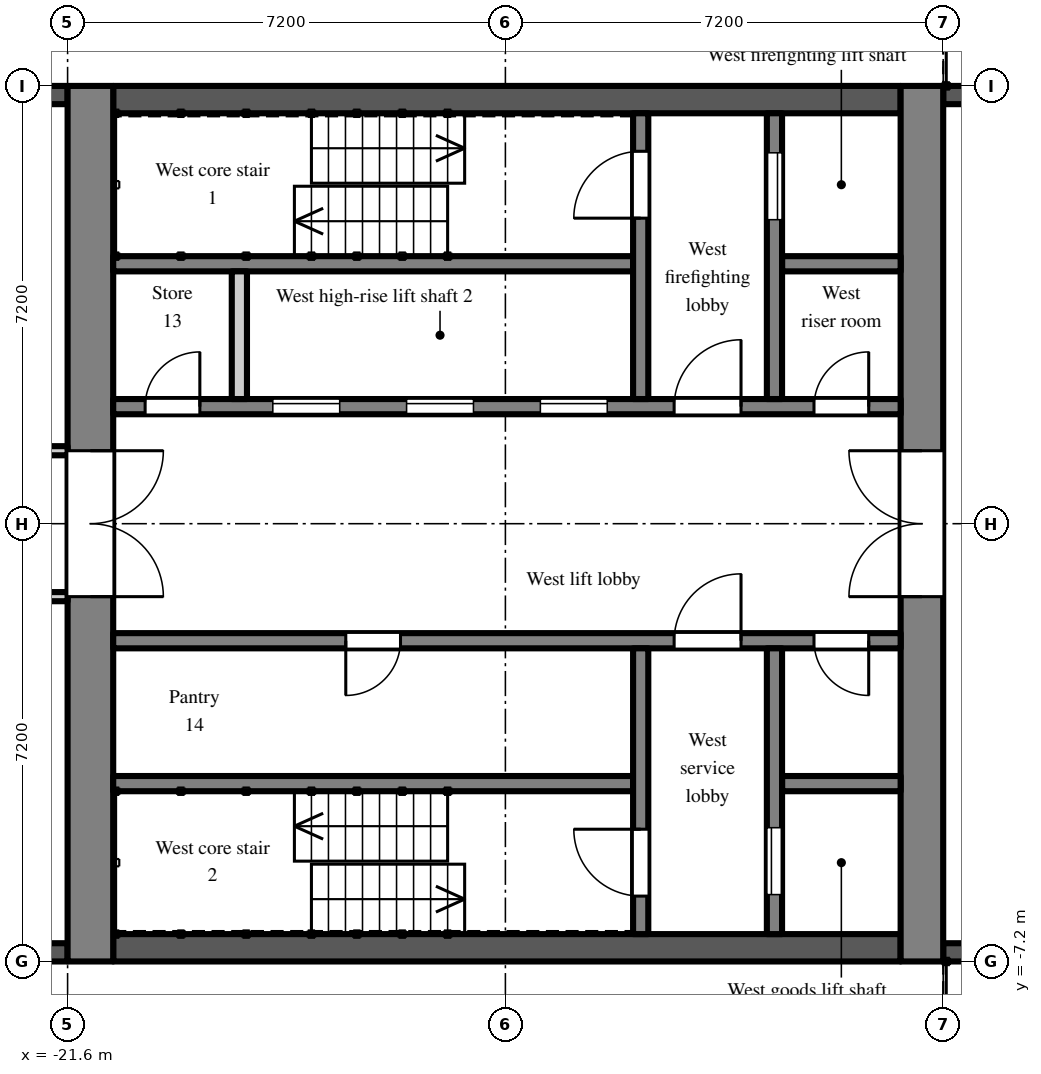
"""IFC4 building model, lengths in metres.
Left out: names, types, materials, properties, quantities, classifications, styles, units other than length and angle.
Written with IfcOpenShell. Run it as: python <this file> out.ifc"""

import sys

from ifc_helpers import new_model, si_unit, direction, frame, frame_2d, origin, place, context, subcontext, project, spatial, rectangle, extrude, element, fill, save


model = new_model("IFC4")
c1 = context("Model", 3, precision=1e-05, world=origin(), true_north=direction((0.0, 1.0)))
c2 = subcontext(c1, "Body", "Model", "MODEL_VIEW")
j1 = project(units=[si_unit("LENGTHUNIT", "METRE"), si_unit("PLANEANGLEUNIT", "RADIAN")], contexts=[c1])
p1 = place(None, origin())
s1 = spatial("IfcSite", under=j1, at=p1, CompositionType="ELEMENT")
p2 = place(p1, origin())
s2 = spatial("IfcBuilding", under=s1, at=p2, CompositionType="ELEMENT")
p3 = place(p2, frame((0.0, 0.0, 159.3)))
s3 = spatial("IfcBuildingStorey", under=s2, at=p3, CompositionType="ELEMENT", Elevation=159.3)
p4 = place(p3, frame((-4.2, 7.05, 0.0), z_axis=(0.0, 0.0, 1.0), x_axis=(-1.0, 0.0, 0.0)))
e1 = element("IfcWall", 1, at=p4, inside=s3, PredefinedType="SOLIDWALL", context=c2, shape_type="SweptSolid", body=[
    extrude(rectangle(XDim=3.0, YDim=0.3, at=frame_2d((1.5, 0.0))), origin(), (0.0, 0.0, 1.0), 2.55),
])
p5 = place(p3, frame((-21.6, 7.05, 0.0), z_axis=(0.0, 0.0, 1.0), x_axis=(-1.0, 0.0, 0.0)))
e2 = element("IfcWall", 2, at=p5, inside=s3, PredefinedType="SOLIDWALL", context=c2, shape_type="SweptSolid", body=[
    extrude(rectangle(XDim=2.7, YDim=0.3, at=frame_2d((1.35, 0.0))), origin(), (0.0, 0.0, 1.0), 2.2),
])
p6 = place(p5, frame((0.75, 0.0, 0.2)))
e3 = element("IfcOpeningElement", 3, at=p6, cuts=e2, PredefinedType="OPENING", context=c2, shape_type="SweptSolid", body=[
    extrude(rectangle(XDim=1.2, YDim=1.85, at=frame_2d((0.6, 0.925))), frame((0.0, 0.16, 0.0), z_axis=(0.0, -1.0, 0.0), x_axis=(1.0, 0.0, 0.0)), (0.0, 0.0, 1.0), 0.32),
])
p7 = place(p3, frame((-24.3, -7.05, 0.0), z_axis=(0.0, 0.0, 1.0), x_axis=(1.0, 0.0, 0.0)))
e4 = element("IfcWall", 4, at=p7, inside=s3, PredefinedType="SOLIDWALL", context=c2, shape_type="SweptSolid", body=[
    extrude(rectangle(XDim=2.7, YDim=0.3, at=frame_2d((1.35, 0.0))), origin(), (0.0, 0.0, 1.0), 2.2),
])
p8 = place(p3, frame((-7.2, -7.05, 0.0), z_axis=(0.0, 0.0, 1.0), x_axis=(1.0, 0.0, 0.0)))
e5 = element("IfcWall", 5, at=p8, inside=s3, PredefinedType="SOLIDWALL", context=c2, shape_type="SweptSolid", body=[
    extrude(rectangle(XDim=3.0, YDim=0.3, at=frame_2d((1.5, 0.0))), origin(), (0.0, 0.0, 1.0), 2.55),
])
p9 = place(p3, frame((-7.55, -7.2, 0.0), z_axis=(0.0, 0.0, 1.0), x_axis=(0.0, 1.0, 0.0)))
e6 = element("IfcWall", 6, at=p9, inside=s3, PredefinedType="SHEAR", context=c2, shape_type="SweptSolid", body=[
    extrude(rectangle(XDim=14.4, YDim=0.7, at=frame_2d((7.2, 0.0))), origin(), (0.0, 0.0, 1.0), 2.55),
])
p10 = place(p9, frame((6.0, 0.0, 0.0)))
e7 = element("IfcOpeningElement", 7, at=p10, cuts=e6, PredefinedType="OPENING", context=c2, shape_type="SweptSolid", body=[
    extrude(rectangle(XDim=2.4, YDim=2.2, at=frame_2d((1.2, 1.1))), frame((0.0, 0.36, 0.0), z_axis=(0.0, -1.0, 0.0), x_axis=(1.0, 0.0, 0.0)), (0.0, 0.0, 1.0), 0.72),
])
p11 = place(p3, frame((-21.225, -7.2, 0.0), z_axis=(0.0, 0.0, 1.0), x_axis=(0.0, 1.0, 0.0)))
e8 = element("IfcWall", 8, at=p11, inside=s3, PredefinedType="SHEAR", context=c2, shape_type="SweptSolid", body=[
    extrude(rectangle(XDim=14.4, YDim=0.75, at=frame_2d((7.2, 0.0))), origin(), (0.0, 0.0, 1.0), 2.55),
])
p12 = place(p11, frame((6.0, 0.0, 0.0)))
e9 = element("IfcOpeningElement", 9, at=p12, cuts=e8, PredefinedType="OPENING", context=c2, shape_type="SweptSolid", body=[
    extrude(rectangle(XDim=2.4, YDim=2.2, at=frame_2d((1.2, 1.1))), frame((0.0, 0.385, 0.0), z_axis=(0.0, -1.0, 0.0), x_axis=(1.0, 0.0, 0.0)), (0.0, 0.0, 1.0), 0.77),
])
p13 = place(p3, frame((-7.9, 6.975, 0.0), z_axis=(0.0, 0.0, 1.0), x_axis=(-1.0, 0.0, 0.0)))
e10 = element("IfcWall", 10, at=p13, inside=s3, PredefinedType="SHEAR", context=c2, shape_type="SweptSolid", body=[
    extrude(rectangle(XDim=12.95, YDim=0.45, at=frame_2d((6.475, 0.0))), origin(), (0.0, 0.0, 1.0), 2.55),
])
p14 = place(p3, frame((-7.9, 1.925, 0.0), z_axis=(0.0, 0.0, 1.0), x_axis=(-1.0, 0.0, 0.0)))
e11 = element("IfcWall", 11, at=p14, inside=s3, PredefinedType="SHEAR", context=c2, shape_type="SweptSolid", body=[
    extrude(rectangle(XDim=12.95, YDim=0.25, at=frame_2d((6.475, 0.0))), origin(), (0.0, 0.0, 1.0), 2.55),
])
p15 = place(p14, frame((4.825, 0.0, 0.0)))
e12 = element("IfcOpeningElement", 12, at=p15, cuts=e11, PredefinedType="OPENING", context=c2, shape_type="SweptSolid", body=[
    extrude(rectangle(XDim=1.1, YDim=2.1, at=frame_2d((0.55, 1.05))), frame((0.0, 0.135, 0.0), z_axis=(0.0, -1.0, 0.0), x_axis=(1.0, 0.0, 0.0)), (0.0, 0.0, 1.0), 0.27),
])
p16 = place(p14, frame((7.025, 0.0, 0.0)))
e13 = element("IfcOpeningElement", 13, at=p16, cuts=e11, PredefinedType="OPENING", context=c2, shape_type="SweptSolid", body=[
    extrude(rectangle(XDim=1.1, YDim=2.1, at=frame_2d((0.55, 1.05))), frame((0.0, 0.135, 0.0), z_axis=(0.0, -1.0, 0.0), x_axis=(1.0, 0.0, 0.0)), (0.0, 0.0, 1.0), 0.27),
])
p17 = place(p14, frame((9.225, 0.0, 0.0)))
e14 = element("IfcOpeningElement", 14, at=p17, cuts=e11, PredefinedType="OPENING", context=c2, shape_type="SweptSolid", body=[
    extrude(rectangle(XDim=1.1, YDim=2.1, at=frame_2d((0.55, 1.05))), frame((0.0, 0.135, 0.0), z_axis=(0.0, -1.0, 0.0), x_axis=(1.0, 0.0, 0.0)), (0.0, 0.0, 1.0), 0.27),
])
p18 = place(p14, frame((0.525, 0.0, 0.0)))
e15 = element("IfcOpeningElement", 15, at=p18, cuts=e11, PredefinedType="OPENING", context=c2, shape_type="SweptSolid", body=[
    extrude(rectangle(XDim=0.9, YDim=2.1, at=frame_2d((0.45, 1.05))), frame((0.0, 0.135, 0.0), z_axis=(0.0, -1.0, 0.0), x_axis=(1.0, 0.0, 0.0)), (0.0, 0.0, 1.0), 0.27),
])
p19 = place(p14, frame((2.625, 0.0, 0.0)))
e16 = element("IfcOpeningElement", 16, at=p19, cuts=e11, PredefinedType="OPENING", context=c2, shape_type="SweptSolid", body=[
    extrude(rectangle(XDim=1.1, YDim=2.1, at=frame_2d((0.55, 1.05))), frame((0.0, 0.135, 0.0), z_axis=(0.0, -1.0, 0.0), x_axis=(1.0, 0.0, 0.0)), (0.0, 0.0, 1.0), 0.27),
])
p20 = place(p14, frame((11.525, 0.0, 0.0)))
e17 = element("IfcOpeningElement", 17, at=p20, cuts=e11, PredefinedType="OPENING", context=c2, shape_type="SweptSolid", body=[
    extrude(rectangle(XDim=0.9, YDim=2.1, at=frame_2d((0.45, 1.05))), frame((0.0, 0.135, 0.0), z_axis=(0.0, -1.0, 0.0), x_axis=(1.0, 0.0, 0.0)), (0.0, 0.0, 1.0), 0.27),
])
p21 = place(p3, frame((-7.9, 4.275, 0.0), z_axis=(0.0, 0.0, 1.0), x_axis=(-1.0, 0.0, 0.0)))
e18 = element("IfcWall", 18, at=p21, inside=s3, PredefinedType="SHEAR", context=c2, shape_type="SweptSolid", body=[
    extrude(rectangle(XDim=1.95, YDim=0.25, at=frame_2d((0.975, 0.0))), origin(), (0.0, 0.0, 1.0), 2.55),
])
p22 = place(p3, frame((-12.3, 4.275, 0.0), z_axis=(0.0, 0.0, 1.0), x_axis=(-1.0, 0.0, 0.0)))
e19 = element("IfcWall", 19, at=p22, inside=s3, PredefinedType="SHEAR", context=c2, shape_type="SweptSolid", body=[
    extrude(rectangle(XDim=8.55, YDim=0.25, at=frame_2d((4.275, 0.0))), origin(), (0.0, 0.0, 1.0), 2.55),
])
p23 = place(p3, frame((-9.975, 2.05, 0.0), z_axis=(0.0, 0.0, 1.0), x_axis=(0.0, 1.0, 0.0)))
e20 = element("IfcWall", 20, at=p23, inside=s3, PredefinedType="SHEAR", context=c2, shape_type="SweptSolid", body=[
    extrude(rectangle(XDim=4.7, YDim=0.25, at=frame_2d((2.35, 0.0))), origin(), (0.0, 0.0, 1.0), 2.55),
])
p24 = place(p23, frame((2.95, 0.0, 0.0)))
e21 = element("IfcOpeningElement", 21, at=p24, cuts=e20, PredefinedType="OPENING", context=c2, shape_type="SweptSolid", body=[
    extrude(rectangle(XDim=1.1, YDim=2.1, at=frame_2d((0.55, 1.05))), frame((0.0, 0.135, 0.0), z_axis=(0.0, -1.0, 0.0), x_axis=(1.0, 0.0, 0.0)), (0.0, 0.0, 1.0), 0.27),
])
p25 = place(p3, frame((-12.175, 2.05, 0.0), z_axis=(0.0, 0.0, 1.0), x_axis=(0.0, 1.0, 0.0)))
e22 = element("IfcWall", 22, at=p25, inside=s3, PredefinedType="SHEAR", context=c2, shape_type="SweptSolid", body=[
    extrude(rectangle(XDim=4.7, YDim=0.25, at=frame_2d((2.35, 0.0))), origin(), (0.0, 0.0, 1.0), 2.55),
])
p26 = place(p25, frame((2.975, 0.0, 0.0)))
e23 = element("IfcOpeningElement", 23, at=p26, cuts=e22, PredefinedType="OPENING", context=c2, shape_type="SweptSolid", body=[
    extrude(rectangle(XDim=1.1, YDim=2.1, at=frame_2d((0.55, 1.05))), frame((0.0, 0.135, 0.0), z_axis=(0.0, -1.0, 0.0), x_axis=(1.0, 0.0, 0.0)), (0.0, 0.0, 1.0), 0.27),
])
p27 = place(p3, frame((-18.775, 2.05, 0.0), z_axis=(0.0, 0.0, 1.0), x_axis=(0.0, 1.0, 0.0)))
e24 = element("IfcWall", 24, at=p27, inside=s3, PredefinedType="PARTITIONING", context=c2, shape_type="SweptSolid", body=[
    extrude(rectangle(XDim=2.1, YDim=0.25, at=frame_2d((1.05, 0.0))), origin(), (0.0, 0.0, 1.0), 2.55),
])
p28 = place(p3, frame((-7.9, -6.975, 0.0), z_axis=(0.0, 0.0, 1.0), x_axis=(-1.0, 0.0, 0.0)))
e25 = element("IfcWall", 25, at=p28, inside=s3, PredefinedType="SHEAR", context=c2, shape_type="SweptSolid", body=[
    extrude(rectangle(XDim=12.95, YDim=0.45, at=frame_2d((6.475, 0.0))), origin(), (0.0, 0.0, 1.0), 2.55),
])
p29 = place(p3, frame((-7.9, -1.925, 0.0), z_axis=(0.0, 0.0, 1.0), x_axis=(-1.0, 0.0, 0.0)))
e26 = element("IfcWall", 26, at=p29, inside=s3, PredefinedType="SHEAR", context=c2, shape_type="SweptSolid", body=[
    extrude(rectangle(XDim=12.95, YDim=0.25, at=frame_2d((6.475, 0.0))), origin(), (0.0, 0.0, 1.0), 2.55),
])
p30 = place(p29, frame((0.525, 0.0, 0.0)))
e27 = element("IfcOpeningElement", 27, at=p30, cuts=e26, PredefinedType="OPENING", context=c2, shape_type="SweptSolid", body=[
    extrude(rectangle(XDim=0.9, YDim=2.1, at=frame_2d((0.45, 1.05))), frame((0.0, 0.135, 0.0), z_axis=(0.0, -1.0, 0.0), x_axis=(1.0, 0.0, 0.0)), (0.0, 0.0, 1.0), 0.27),
])
p31 = place(p29, frame((2.625, 0.0, 0.0)))
e28 = element("IfcOpeningElement", 28, at=p31, cuts=e26, PredefinedType="OPENING", context=c2, shape_type="SweptSolid", body=[
    extrude(rectangle(XDim=1.1, YDim=2.1, at=frame_2d((0.55, 1.05))), frame((0.0, 0.135, 0.0), z_axis=(0.0, -1.0, 0.0), x_axis=(1.0, 0.0, 0.0)), (0.0, 0.0, 1.0), 0.27),
])
p32 = place(p29, frame((8.225, 0.0, 0.0)))
e29 = element("IfcOpeningElement", 29, at=p32, cuts=e26, PredefinedType="OPENING", context=c2, shape_type="SweptSolid", body=[
    extrude(rectangle(XDim=0.9, YDim=2.1, at=frame_2d((0.45, 1.05))), frame((0.0, 0.135, 0.0), z_axis=(0.0, -1.0, 0.0), x_axis=(1.0, 0.0, 0.0)), (0.0, 0.0, 1.0), 0.27),
])
p33 = place(p3, frame((-7.9, -4.275, 0.0), z_axis=(0.0, 0.0, 1.0), x_axis=(-1.0, 0.0, 0.0)))
e30 = element("IfcWall", 30, at=p33, inside=s3, PredefinedType="SHEAR", context=c2, shape_type="SweptSolid", body=[
    extrude(rectangle(XDim=1.95, YDim=0.25, at=frame_2d((0.975, 0.0))), origin(), (0.0, 0.0, 1.0), 2.55),
])
p34 = place(p3, frame((-12.3, -4.275, 0.0), z_axis=(0.0, 0.0, 1.0), x_axis=(-1.0, 0.0, 0.0)))
e31 = element("IfcWall", 31, at=p34, inside=s3, PredefinedType="SHEAR", context=c2, shape_type="SweptSolid", body=[
    extrude(rectangle(XDim=8.55, YDim=0.25, at=frame_2d((4.275, 0.0))), origin(), (0.0, 0.0, 1.0), 2.55),
])
p35 = place(p3, frame((-9.975, -2.05, 0.0), z_axis=(0.0, 0.0, 1.0), x_axis=(0.0, -1.0, 0.0)))
e32 = element("IfcWall", 32, at=p35, inside=s3, PredefinedType="SHEAR", context=c2, shape_type="SweptSolid", body=[
    extrude(rectangle(XDim=4.7, YDim=0.25, at=frame_2d((2.35, 0.0))), origin(), (0.0, 0.0, 1.0), 2.55),
])
p36 = place(p35, frame((2.95, 0.0, 0.0)))
e33 = element("IfcOpeningElement", 33, at=p36, cuts=e32, PredefinedType="OPENING", context=c2, shape_type="SweptSolid", body=[
    extrude(rectangle(XDim=1.1, YDim=2.1, at=frame_2d((0.55, 1.05))), frame((0.0, 0.135, 0.0), z_axis=(0.0, -1.0, 0.0), x_axis=(1.0, 0.0, 0.0)), (0.0, 0.0, 1.0), 0.27),
])
p37 = place(p3, frame((-12.175, -2.05, 0.0), z_axis=(0.0, 0.0, 1.0), x_axis=(0.0, -1.0, 0.0)))
e34 = element("IfcWall", 34, at=p37, inside=s3, PredefinedType="SHEAR", context=c2, shape_type="SweptSolid", body=[
    extrude(rectangle(XDim=4.7, YDim=0.25, at=frame_2d((2.35, 0.0))), origin(), (0.0, 0.0, 1.0), 2.55),
])
p38 = place(p37, frame((2.975, 0.0, 0.0)))
e35 = element("IfcOpeningElement", 35, at=p38, cuts=e34, PredefinedType="OPENING", context=c2, shape_type="SweptSolid", body=[
    extrude(rectangle(XDim=1.1, YDim=2.1, at=frame_2d((0.55, 1.05))), frame((0.0, 0.135, 0.0), z_axis=(0.0, -1.0, 0.0), x_axis=(1.0, 0.0, 0.0)), (0.0, 0.0, 1.0), 0.27),
])
p39 = place(p3, frame((-36.5, -1.2, 0.0), z_axis=(0.0, 0.0, 1.0), x_axis=(1.0, 0.0, 0.0)))
e36 = element("IfcWall", 36, at=p39, inside=s3, PredefinedType="PARTITIONING", context=c2, shape_type="SweptSolid", body=[
    extrude(rectangle(XDim=14.9, YDim=0.15, at=frame_2d((7.45, 0.0))), origin(), (0.0, 0.0, 1.0), 2.55),
])
p40 = place(p39, frame((10.4, 0.0, 0.0)))
e37 = element("IfcOpeningElement", 37, at=p40, cuts=e36, PredefinedType="OPENING", context=c2, shape_type="SweptSolid", body=[
    extrude(rectangle(XDim=1.8, YDim=2.1, at=frame_2d((0.9, 1.05))), frame((0.0, 0.085, 0.0), z_axis=(0.0, -1.0, 0.0), x_axis=(1.0, 0.0, 0.0)), (0.0, 0.0, 1.0), 0.17),
])
p41 = place(p39, frame((4.3, 0.0, 0.0)))
e38 = element("IfcOpeningElement", 38, at=p41, cuts=e36, PredefinedType="OPENING", context=c2, shape_type="SweptSolid", body=[
    extrude(rectangle(XDim=1.0, YDim=2.1, at=frame_2d((0.5, 1.05))), frame((0.0, 0.085, 0.0), z_axis=(0.0, -1.0, 0.0), x_axis=(1.0, 0.0, 0.0)), (0.0, 0.0, 1.0), 0.17),
])
p42 = place(p39, frame((1.15, 0.0, 0.0)))
e39 = element("IfcOpeningElement", 39, at=p42, cuts=e36, PredefinedType="OPENING", context=c2, shape_type="SweptSolid", body=[
    extrude(rectangle(XDim=1.8, YDim=2.1, at=frame_2d((0.9, 1.05))), frame((0.0, 0.085, 0.0), z_axis=(0.0, -1.0, 0.0), x_axis=(1.0, 0.0, 0.0)), (0.0, 0.0, 1.0), 0.17),
])
p43 = place(p3, frame((-36.5, 1.2, 0.0), z_axis=(0.0, 0.0, 1.0), x_axis=(1.0, 0.0, 0.0)))
e40 = element("IfcWall", 40, at=p43, inside=s3, PredefinedType="PARTITIONING", context=c2, shape_type="SweptSolid", body=[
    extrude(rectangle(XDim=14.9, YDim=0.15, at=frame_2d((7.45, 0.0))), origin(), (0.0, 0.0, 1.0), 2.55),
])
p44 = place(p43, frame((10.4, 0.0, 0.0)))
e41 = element("IfcOpeningElement", 41, at=p44, cuts=e40, PredefinedType="OPENING", context=c2, shape_type="SweptSolid", body=[
    extrude(rectangle(XDim=1.8, YDim=2.1, at=frame_2d((0.9, 1.05))), frame((0.0, 0.085, 0.0), z_axis=(0.0, -1.0, 0.0), x_axis=(1.0, 0.0, 0.0)), (0.0, 0.0, 1.0), 0.17),
])
p45 = place(p43, frame((5.45, 0.0, 0.0)))
e42 = element("IfcOpeningElement", 42, at=p45, cuts=e40, PredefinedType="OPENING", context=c2, shape_type="SweptSolid", body=[
    extrude(rectangle(XDim=0.9, YDim=2.1, at=frame_2d((0.45, 1.05))), frame((0.0, 0.085, 0.0), z_axis=(0.0, -1.0, 0.0), x_axis=(1.0, 0.0, 0.0)), (0.0, 0.0, 1.0), 0.17),
])
p46 = place(p43, frame((1.15, 0.0, 0.0)))
e43 = element("IfcOpeningElement", 43, at=p46, cuts=e40, PredefinedType="OPENING", context=c2, shape_type="SweptSolid", body=[
    extrude(rectangle(XDim=1.8, YDim=2.1, at=frame_2d((0.9, 1.05))), frame((0.0, 0.085, 0.0), z_axis=(0.0, -1.0, 0.0), x_axis=(1.0, 0.0, 0.0)), (0.0, 0.0, 1.0), 0.17),
])
p47 = place(p15, origin())
e44 = element("IfcDoor", 44, at=p47, inside=s3, OperationType="SLIDING_TO_LEFT", PredefinedType="DOOR", context=c2, shape_type="SweptSolid", body=[
    extrude(rectangle(XDim=1.1, YDim=2.1, at=frame_2d((0.55, 1.05))), frame((0.0, 0.025, 0.0), z_axis=(0.0, -1.0, 0.0), x_axis=(1.0, 0.0, 0.0)), (0.0, 0.0, 1.0), 0.05),
])
fill(e12, e44)
p48 = place(p16, origin())
e45 = element("IfcDoor", 45, at=p48, inside=s3, OperationType="SLIDING_TO_LEFT", PredefinedType="DOOR", context=c2, shape_type="SweptSolid", body=[
    extrude(rectangle(XDim=1.1, YDim=2.1, at=frame_2d((0.55, 1.05))), frame((0.0, 0.025, 0.0), z_axis=(0.0, -1.0, 0.0), x_axis=(1.0, 0.0, 0.0)), (0.0, 0.0, 1.0), 0.05),
])
fill(e13, e45)
p49 = place(p17, origin())
e46 = element("IfcDoor", 46, at=p49, inside=s3, OperationType="SLIDING_TO_LEFT", PredefinedType="DOOR", context=c2, shape_type="SweptSolid", body=[
    extrude(rectangle(XDim=1.1, YDim=2.1, at=frame_2d((0.55, 1.05))), frame((0.0, 0.025, 0.0), z_axis=(0.0, -1.0, 0.0), x_axis=(1.0, 0.0, 0.0)), (0.0, 0.0, 1.0), 0.05),
])
fill(e14, e46)
p50 = place(p24, origin())
e47 = element("IfcDoor", 47, at=p50, inside=s3, OperationType="SLIDING_TO_LEFT", PredefinedType="DOOR", context=c2, shape_type="SweptSolid", body=[
    extrude(rectangle(XDim=1.1, YDim=2.1, at=frame_2d((0.55, 1.05))), frame((0.0, 0.025, 0.0), z_axis=(0.0, -1.0, 0.0), x_axis=(1.0, 0.0, 0.0)), (0.0, 0.0, 1.0), 0.05),
])
fill(e21, e47)
p51 = place(p36, origin())
e48 = element("IfcDoor", 48, at=p51, inside=s3, OperationType="SLIDING_TO_LEFT", PredefinedType="DOOR", context=c2, shape_type="SweptSolid", body=[
    extrude(rectangle(XDim=1.1, YDim=2.1, at=frame_2d((0.55, 1.05))), frame((0.0, 0.025, 0.0), z_axis=(0.0, -1.0, 0.0), x_axis=(1.0, 0.0, 0.0)), (0.0, 0.0, 1.0), 0.05),
])
fill(e33, e48)
p52 = place(p26, origin())
e49 = element("IfcDoor", 49, at=p52, inside=s3, OperationType="SINGLE_SWING_LEFT", PredefinedType="DOOR", context=c2, shape_type="SweptSolid", body=[
    extrude(rectangle(XDim=1.1, YDim=2.1, at=frame_2d((0.55, 1.05))), frame((0.0, 0.025, 0.0), z_axis=(0.0, -1.0, 0.0), x_axis=(1.0, 0.0, 0.0)), (0.0, 0.0, 1.0), 0.05),
])
fill(e23, e49)
p53 = place(p38, frame((1.1, 0.0, 0.0), z_axis=(0.0, 0.0, 1.0), x_axis=(-1.0, 0.0, 0.0)))
e50 = element("IfcDoor", 50, at=p53, inside=s3, OperationType="SINGLE_SWING_RIGHT", PredefinedType="DOOR", context=c2, shape_type="SweptSolid", body=[
    extrude(rectangle(XDim=1.1, YDim=2.1, at=frame_2d((0.55, 1.05))), frame((0.0, 0.025, 0.0), z_axis=(0.0, -1.0, 0.0), x_axis=(1.0, 0.0, 0.0)), (0.0, 0.0, 1.0), 0.05),
])
fill(e35, e50)
p54 = place(p18, frame((0.9, 0.0, 0.0), z_axis=(0.0, 0.0, 1.0), x_axis=(-1.0, 0.0, 0.0)))
e51 = element("IfcDoor", 51, at=p54, inside=s3, OperationType="SINGLE_SWING_RIGHT", PredefinedType="DOOR", context=c2, shape_type="SweptSolid", body=[
    extrude(rectangle(XDim=0.9, YDim=2.1, at=frame_2d((0.45, 1.05))), frame((0.0, 0.025, 0.0), z_axis=(0.0, -1.0, 0.0), x_axis=(1.0, 0.0, 0.0)), (0.0, 0.0, 1.0), 0.05),
])
fill(e15, e51)
p55 = place(p30, origin())
e52 = element("IfcDoor", 52, at=p55, inside=s3, OperationType="SINGLE_SWING_LEFT", PredefinedType="DOOR", context=c2, shape_type="SweptSolid", body=[
    extrude(rectangle(XDim=0.9, YDim=2.1, at=frame_2d((0.45, 1.05))), frame((0.0, 0.025, 0.0), z_axis=(0.0, -1.0, 0.0), x_axis=(1.0, 0.0, 0.0)), (0.0, 0.0, 1.0), 0.05),
])
fill(e27, e52)
p56 = place(p19, frame((1.1, 0.0, 0.0), z_axis=(0.0, 0.0, 1.0), x_axis=(-1.0, 0.0, 0.0)))
e53 = element("IfcDoor", 53, at=p56, inside=s3, OperationType="SINGLE_SWING_RIGHT", PredefinedType="DOOR", context=c2, shape_type="SweptSolid", body=[
    extrude(rectangle(XDim=1.1, YDim=2.1, at=frame_2d((0.55, 1.05))), frame((0.0, 0.025, 0.0), z_axis=(0.0, -1.0, 0.0), x_axis=(1.0, 0.0, 0.0)), (0.0, 0.0, 1.0), 0.05),
])
fill(e16, e53)
p57 = place(p31, frame((1.1, 0.0, 0.0), z_axis=(0.0, 0.0, 1.0), x_axis=(-1.0, 0.0, 0.0)))
e54 = element("IfcDoor", 54, at=p57, inside=s3, OperationType="SINGLE_SWING_RIGHT", PredefinedType="DOOR", context=c2, shape_type="SweptSolid", body=[
    extrude(rectangle(XDim=1.1, YDim=2.1, at=frame_2d((0.55, 1.05))), frame((0.0, 0.025, 0.0), z_axis=(0.0, -1.0, 0.0), x_axis=(1.0, 0.0, 0.0)), (0.0, 0.0, 1.0), 0.05),
])
fill(e28, e54)
p58 = place(p10, origin())
e55 = element("IfcDoor", 55, at=p58, inside=s3, OperationType="DOUBLE_DOOR_DOUBLE_SWING", PredefinedType="DOOR", context=c2, shape_type="SweptSolid", body=[
    extrude(rectangle(XDim=2.4, YDim=2.2, at=frame_2d((1.2, 1.1))), frame((0.0, 0.025, 0.0), z_axis=(0.0, -1.0, 0.0), x_axis=(1.0, 0.0, 0.0)), (0.0, 0.0, 1.0), 0.05),
])
fill(e7, e55)
p59 = place(p12, frame((2.4, 0.0, 0.0), z_axis=(0.0, 0.0, 1.0), x_axis=(-1.0, 0.0, 0.0)))
e56 = element("IfcDoor", 56, at=p59, inside=s3, OperationType="DOUBLE_DOOR_DOUBLE_SWING", PredefinedType="DOOR", context=c2, shape_type="SweptSolid", body=[
    extrude(rectangle(XDim=2.4, YDim=2.2, at=frame_2d((1.2, 1.1))), frame((0.0, 0.025, 0.0), z_axis=(0.0, -1.0, 0.0), x_axis=(1.0, 0.0, 0.0)), (0.0, 0.0, 1.0), 0.05),
])
fill(e9, e56)
p60 = place(p20, frame((0.9, 0.0, 0.0), z_axis=(0.0, 0.0, 1.0), x_axis=(-1.0, 0.0, 0.0)))
e57 = element("IfcDoor", 57, at=p60, inside=s3, OperationType="SINGLE_SWING_RIGHT", PredefinedType="DOOR", context=c2, shape_type="SweptSolid", body=[
    extrude(rectangle(XDim=0.9, YDim=2.1, at=frame_2d((0.45, 1.05))), frame((0.0, 0.025, 0.0), z_axis=(0.0, -1.0, 0.0), x_axis=(1.0, 0.0, 0.0)), (0.0, 0.0, 1.0), 0.05),
])
fill(e17, e57)
p61 = place(p32, origin())
e58 = element("IfcDoor", 58, at=p61, inside=s3, OperationType="SINGLE_SWING_RIGHT", PredefinedType="DOOR", context=c2, shape_type="SweptSolid", body=[
    extrude(rectangle(XDim=0.9, YDim=2.1, at=frame_2d((0.45, 1.05))), frame((0.0, 0.025, 0.0), z_axis=(0.0, -1.0, 0.0), x_axis=(1.0, 0.0, 0.0)), (0.0, 0.0, 1.0), 0.05),
])
fill(e29, e58)
save(model, sys.argv[1])
